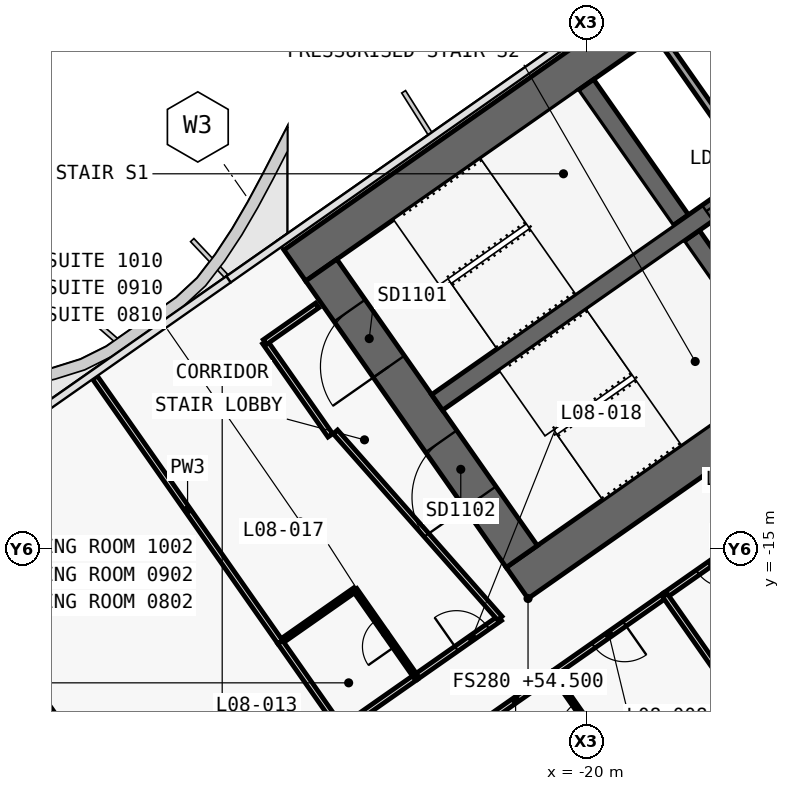
"""IFC4 building model, lengths in metres.
Left out: names, types, materials, properties, quantities, classifications, styles, units other than length and angle.
Written with IfcOpenShell. Run it as: python <this file> out.ifc"""

import sys

from ifc_helpers import new_model, si_unit, direction, frame, frame_2d, origin, place, context, subcontext, project, spatial, polyline, rectangle, outline, extrude, element, fill, save


model = new_model("IFC4")
c1 = context("Model", 3, precision=1e-05, world=origin(), true_north=direction((0.0, 1.0)))
c2 = subcontext(c1, "Body", "Model", "MODEL_VIEW")
j1 = project(units=[si_unit("LENGTHUNIT", "METRE"), si_unit("PLANEANGLEUNIT", "RADIAN")], contexts=[c1])
p1 = place(None, origin())
s1 = spatial("IfcSite", under=j1, at=p1, CompositionType="ELEMENT")
p2 = place(p1, origin())
s2 = spatial("IfcBuilding", under=s1, at=p2, CompositionType="ELEMENT")
p3 = place(p2, frame((0.0, 0.0, 54.5)))
s3 = spatial("IfcBuildingStorey", under=s2, at=p3, CompositionType="ELEMENT", Elevation=54.5)
p4 = place(p3, frame((0.037, 11.867, 0.0), z_axis=(0.0, 0.0, 1.0), x_axis=(-0.819155306259, -0.573571777746, 0.0)))
e1 = element("IfcWall", 1, at=p4, inside=s3, PredefinedType="SHEAR", context=c2, shape_type="SweptSolid", body=[
    extrude(outline(polyline([(33.837, 0.5), (0.7, 0.5), (0.0, -0.5), (33.837, -0.5), (33.837, 0.5)])), origin(), (0.0, 0.0, 1.0), 3.6),
])
p5 = place(p3, frame((0.037, -0.585, 0.0), z_axis=(0.0, 0.0, 1.0), x_axis=(-0.819157152511, -0.573569140985, 0.0)))
e2 = element("IfcWall", 2, at=p5, inside=s3, PredefinedType="SHEAR", context=c2, shape_type="SweptSolid", body=[
    extrude(outline(polyline([(26.695, 0.5), (0.7, 0.5), (0.0, -0.5), (26.695, -0.5), (26.695, 0.5)])), origin(), (0.0, 0.0, 1.0), 3.6),
])
p6 = place(p5, frame((2.995, 0.0, 0.0)))
e3 = element("IfcOpeningElement", 3, at=p6, cuts=e2, PredefinedType="OPENING", context=c2, shape_type="SweptSolid", body=[
    extrude(rectangle(XDim=2.4, YDim=2.1, at=frame_2d((1.2, 1.05))), frame((0.0, 0.51, 0.0), z_axis=(0.0, -1.0, 0.0), x_axis=(1.0, 0.0, 0.0)), (0.0, 0.0, 1.0), 1.02),
])
p7 = place(p5, frame((11.995, 0.0, 0.0)))
e4 = element("IfcOpeningElement", 4, at=p7, cuts=e2, PredefinedType="OPENING", context=c2, shape_type="SweptSolid", body=[
    extrude(rectangle(XDim=2.4, YDim=2.1, at=frame_2d((1.2, 1.05))), frame((0.0, 0.51, 0.0), z_axis=(0.0, -1.0, 0.0), x_axis=(1.0, 0.0, 0.0)), (0.0, 0.0, 1.0), 1.02),
])
p8 = place(p3, frame((-21.708, -15.2, 0.0), z_axis=(0.0, 0.0, 1.0), x_axis=(-0.573576324356, 0.819152122709, 0.0)))
e5 = element("IfcWall", 5, at=p8, inside=s3, PredefinedType="SHEAR", context=c2, shape_type="SweptSolid", body=[
    extrude(outline(polyline([(0.0, 0.5), (0.0, -0.5), (9.2, -0.5), (9.2, 0.5), (0.0, 0.5)])), origin(), (0.0, 0.0, 1.0), 3.6),
])
p9 = place(p8, frame((6.1, 0.0, 0.0)))
e6 = element("IfcOpeningElement", 6, at=p9, cuts=e5, PredefinedType="OPENING", context=c2, shape_type="SweptSolid", body=[
    extrude(rectangle(XDim=1.8, YDim=2.1, at=frame_2d((0.9, 1.05))), frame((0.0, 0.51, 0.0), z_axis=(0.0, -1.0, 0.0), x_axis=(1.0, 0.0, 0.0)), (0.0, 0.0, 1.0), 1.02),
])
p10 = place(p8, frame((1.9, 0.0, 0.0)))
e7 = element("IfcOpeningElement", 7, at=p10, cuts=e5, PredefinedType="OPENING", context=c2, shape_type="SweptSolid", body=[
    extrude(rectangle(XDim=1.8, YDim=2.1, at=frame_2d((0.9, 1.05))), frame((0.0, 0.51, 0.0), z_axis=(0.0, -1.0, 0.0), x_axis=(1.0, 0.0, 0.0)), (0.0, 0.0, 1.0), 1.02),
])
p11 = place(p3, frame((-14.745, -10.324, 0.0), z_axis=(0.0, 0.0, 1.0), x_axis=(-0.57356780395, 0.819158088694, 0.0)))
e8 = element("IfcWall", 8, at=p11, inside=s3, PredefinedType="SHEAR", context=c2, shape_type="SweptSolid", body=[
    extrude(outline(polyline([(4.35, 0.25), (0.0, 0.25), (0.0, -0.25), (4.35, -0.25), (4.35, 0.25)])), origin(), (0.0, 0.0, 1.0), 3.6),
])
p12 = place(p3, frame((-17.527, -6.352, 0.0), z_axis=(0.0, 0.0, 1.0), x_axis=(-0.573530143085, 0.819184457233, 0.0)))
e9 = element("IfcWall", 9, at=p12, inside=s3, PredefinedType="SHEAR", context=c2, shape_type="SweptSolid", body=[
    extrude(outline(polyline([(4.35, -0.25), (4.35, 0.25), (0.0, 0.25), (0.0, -0.25), (4.35, -0.25)])), origin(), (0.0, 0.0, 1.0), 3.6),
])
p13 = place(p3, frame((-2.638, 3.768, 0.0), z_axis=(0.0, 0.0, 1.0), x_axis=(-0.819148977158, -0.573580816643, 0.0)))
e10 = element("IfcWall", 10, at=p13, inside=s3, PredefinedType="SHEAR", context=c2, shape_type="SweptSolid", body=[
    extrude(outline(polyline([(26.0, 0.25), (0.0, 0.25), (0.0, -0.25), (26.0, -0.25), (26.0, 0.25)])), origin(), (0.0, 0.0, 1.0), 3.6),
])
p14 = place(p13, frame((1.169, 0.0, 0.0)))
e11 = element("IfcOpeningElement", 11, at=p14, cuts=e10, PredefinedType="OPENING", context=c2, shape_type="SweptSolid", body=[
    extrude(rectangle(XDim=1.1, YDim=2.1, at=frame_2d((0.55, 1.05))), frame((0.0, 0.26, 0.0), z_axis=(0.0, -1.0, 0.0), x_axis=(1.0, 0.0, 0.0)), (0.0, 0.0, 1.0), 0.52),
])
p15 = place(p13, frame((3.206, 0.0, 0.0)))
e12 = element("IfcOpeningElement", 12, at=p15, cuts=e10, PredefinedType="OPENING", context=c2, shape_type="SweptSolid", body=[
    extrude(rectangle(XDim=1.1, YDim=2.1, at=frame_2d((0.55, 1.05))), frame((0.0, 0.26, 0.0), z_axis=(0.0, -1.0, 0.0), x_axis=(1.0, 0.0, 0.0)), (0.0, 0.0, 1.0), 0.52),
])
p16 = place(p13, frame((5.244, 0.0, 0.0)))
e13 = element("IfcOpeningElement", 13, at=p16, cuts=e10, PredefinedType="OPENING", context=c2, shape_type="SweptSolid", body=[
    extrude(rectangle(XDim=1.1, YDim=2.1, at=frame_2d((0.55, 1.05))), frame((0.0, 0.26, 0.0), z_axis=(0.0, -1.0, 0.0), x_axis=(1.0, 0.0, 0.0)), (0.0, 0.0, 1.0), 0.52),
])
p17 = place(p13, frame((7.281, 0.0, 0.0)))
e14 = element("IfcOpeningElement", 14, at=p17, cuts=e10, PredefinedType="OPENING", context=c2, shape_type="SweptSolid", body=[
    extrude(rectangle(XDim=1.1, YDim=2.1, at=frame_2d((0.55, 1.05))), frame((0.0, 0.26, 0.0), z_axis=(0.0, -1.0, 0.0), x_axis=(1.0, 0.0, 0.0)), (0.0, 0.0, 1.0), 0.52),
])
p18 = place(p13, frame((9.688, 0.0, 0.0)))
e15 = element("IfcOpeningElement", 15, at=p18, cuts=e10, PredefinedType="OPENING", context=c2, shape_type="SweptSolid", body=[
    extrude(rectangle(XDim=1.1, YDim=2.1, at=frame_2d((0.55, 1.05))), frame((0.0, 0.26, 0.0), z_axis=(0.0, -1.0, 0.0), x_axis=(1.0, 0.0, 0.0)), (0.0, 0.0, 1.0), 0.52),
])
p19 = place(p13, frame((11.863, 0.0, 0.0)))
e16 = element("IfcOpeningElement", 16, at=p19, cuts=e10, PredefinedType="OPENING", context=c2, shape_type="SweptSolid", body=[
    extrude(rectangle(XDim=1.1, YDim=2.1, at=frame_2d((0.55, 1.05))), frame((0.0, 0.26, 0.0), z_axis=(0.0, -1.0, 0.0), x_axis=(1.0, 0.0, 0.0)), (0.0, 0.0, 1.0), 0.52),
])
p20 = place(p13, frame((14.038, 0.0, 0.0)))
e17 = element("IfcOpeningElement", 17, at=p20, cuts=e10, PredefinedType="OPENING", context=c2, shape_type="SweptSolid", body=[
    extrude(rectangle(XDim=1.1, YDim=2.1, at=frame_2d((0.55, 1.05))), frame((0.0, 0.26, 0.0), z_axis=(0.0, -1.0, 0.0), x_axis=(1.0, 0.0, 0.0)), (0.0, 0.0, 1.0), 0.52),
])
p21 = place(p13, frame((16.212, 0.0, 0.0)))
e18 = element("IfcOpeningElement", 18, at=p21, cuts=e10, PredefinedType="OPENING", context=c2, shape_type="SweptSolid", body=[
    extrude(rectangle(XDim=1.1, YDim=2.1, at=frame_2d((0.55, 1.05))), frame((0.0, 0.26, 0.0), z_axis=(0.0, -1.0, 0.0), x_axis=(1.0, 0.0, 0.0)), (0.0, 0.0, 1.0), 0.52),
])
p22 = place(p3, frame((-15.622, -5.018, 0.0), z_axis=(0.0, 0.0, 1.0), x_axis=(-0.573594173421, 0.819139624372, 0.0)))
e19 = element("IfcWall", 19, at=p22, inside=s3, PredefinedType="SOLIDWALL", context=c2, shape_type="SweptSolid", body=[
    extrude(rectangle(XDim=4.35, YDim=0.2, at=frame_2d((2.175, 0.0))), origin(), (0.0, 0.0, 1.0), 3.6),
])
p23 = place(p3, frame((-24.493, -18.371, 0.0), z_axis=(0.0, 0.0, 1.0), x_axis=(0.819176640776, 0.573541307325, 0.0)))
e20 = element("IfcWall", 20, at=p23, inside=s3, PredefinedType="PARTITIONING", context=c2, shape_type="SweptSolid", body=[
    extrude(rectangle(XDim=2.698, YDim=0.15, at=frame_2d((1.349, 0.0))), origin(), (0.0, 0.0, 1.0), 3.32),
])
p24 = place(p23, frame((1.301, 0.0, 0.0)))
e21 = element("IfcOpeningElement", 21, at=p24, cuts=e20, PredefinedType="OPENING", context=c2, shape_type="SweptSolid", body=[
    extrude(rectangle(XDim=1.0, YDim=2.1, at=frame_2d((0.5, 1.05))), frame((0.0, 0.085, 0.0), z_axis=(0.0, -1.0, 0.0), x_axis=(1.0, 0.0, 0.0)), (0.0, 0.0, 1.0), 0.17),
])
p25 = place(p3, frame((-26.46, -19.748, 0.0), z_axis=(0.0, 0.0, 1.0), x_axis=(0.819179439794, 0.573537309527, 0.0)))
e22 = element("IfcWall", 22, at=p25, inside=s3, PredefinedType="PARTITIONING", context=c2, shape_type="SweptSolid", body=[
    extrude(rectangle(XDim=2.404, YDim=0.15, at=frame_2d((1.202, 0.0))), origin(), (0.0, 0.0, 1.0), 3.32),
])
p26 = place(p3, frame((-15.48, -14.501, 0.0), z_axis=(0.0, 0.0, 1.0), x_axis=(-0.819193738533, -0.573516886193, 0.0)))
e23 = element("IfcWall", 23, at=p26, inside=s3, PredefinedType="PARTITIONING", context=c2, shape_type="SweptSolid", body=[
    extrude(rectangle(XDim=3.004, YDim=0.15, at=frame_2d((1.502, 0.0))), origin(), (0.0, 0.0, 1.0), 3.32),
])
p27 = place(p26, frame((1.052, 0.0, 0.0)))
e24 = element("IfcOpeningElement", 24, at=p27, cuts=e23, PredefinedType="OPENING", context=c2, shape_type="SweptSolid", body=[
    extrude(rectangle(XDim=0.9, YDim=2.1, at=frame_2d((0.45, 1.05))), frame((0.0, 0.085, 0.0), z_axis=(0.0, -1.0, 0.0), x_axis=(1.0, 0.0, 0.0)), (0.0, 0.0, 1.0), 0.17),
])
p28 = place(p3, frame((-17.937, -16.222, 0.0), z_axis=(0.0, 0.0, 1.0), x_axis=(-0.819145961204, -0.573585123798, 0.0)))
e25 = element("IfcWall", 25, at=p28, inside=s3, PredefinedType="PARTITIONING", context=c2, shape_type="SweptSolid", body=[
    extrude(rectangle(XDim=3.603, YDim=0.15, at=frame_2d((1.802, 0.0))), origin(), (0.0, 0.0, 1.0), 2.6),
])
p29 = place(p28, frame((1.302, 0.0, 0.0)))
e26 = element("IfcOpeningElement", 26, at=p29, cuts=e25, PredefinedType="OPENING", context=c2, shape_type="SweptSolid", body=[
    extrude(rectangle(XDim=1.0, YDim=2.1, at=frame_2d((0.5, 1.05))), frame((0.0, 0.085, 0.0), z_axis=(0.0, -1.0, 0.0), x_axis=(1.0, 0.0, 0.0)), (0.0, 0.0, 1.0), 0.17),
])
p30 = place(p3, frame((-20.886, -18.287, 0.0), z_axis=(0.0, 0.0, 1.0), x_axis=(-0.819146032251, -0.573585022335, 0.0)))
e27 = element("IfcWall", 27, at=p30, inside=s3, PredefinedType="PARTITIONING", context=c2, shape_type="SweptSolid", body=[
    extrude(rectangle(XDim=2.404, YDim=0.15, at=frame_2d((1.202, 0.0))), origin(), (0.0, 0.0, 1.0), 3.32),
])
p31 = place(p3, frame((-26.746, -12.014, 0.0), z_axis=(0.0, 0.0, 1.0), x_axis=(-0.573560650686, 0.819163097304, 0.0)))
e28 = element("IfcWall", 28, at=p31, inside=s3, PredefinedType="PARTITIONING", context=c2, shape_type="SweptSolid", body=[
    extrude(rectangle(XDim=3.0, YDim=0.15, at=frame_2d((1.5, 0.0))), origin(), (0.0, 0.0, 1.0), 3.32),
])
p32 = place(p3, frame((-28.467, -9.556, 0.0), z_axis=(0.0, 0.0, 1.0), x_axis=(0.819109000826, 0.573637903879, 0.0)))
e29 = element("IfcWall", 29, at=p32, inside=s3, PredefinedType="PARTITIONING", context=c2, shape_type="SweptSolid", body=[
    extrude(rectangle(XDim=1.68, YDim=0.15, at=frame_2d((0.84, 0.0))), origin(), (0.0, 0.0, 1.0), 3.32),
])
p33 = place(p3, frame((-22.284, -16.827, 0.0), z_axis=(0.0, 0.0, 1.0), x_axis=(-0.661545117561, 0.749905365651, 0.0)))
e30 = element("IfcWall", 30, at=p33, inside=s3, PredefinedType="PARTITIONING", context=c2, shape_type="SweptSolid", body=[
    extrude(rectangle(XDim=6.543, YDim=0.15, at=frame_2d((3.271, 0.0))), origin(), (0.0, 0.0, 1.0), 2.6),
])
p34 = place(p3, frame((-24.492, -18.37, 0.0), z_axis=(0.0, 0.0, 1.0), x_axis=(-0.573550118428, 0.819170471667, 0.0)))
e31 = element("IfcWall", 31, at=p34, inside=s3, PredefinedType="PARTITIONING", context=c2, shape_type="SweptSolid", body=[
    extrude(rectangle(XDim=2.8, YDim=0.12, at=frame_2d((1.4, 0.0))), origin(), (0.0, 0.0, 1.0), 2.6),
])
p35 = place(p34, frame((0.975, 0.0, 0.0)))
e32 = element("IfcOpeningElement", 32, at=p35, cuts=e31, PredefinedType="OPENING", context=c2, shape_type="SweptSolid", body=[
    extrude(rectangle(XDim=0.85, YDim=2.05, at=frame_2d((0.425, 1.025))), frame((0.0, 0.07, 0.0), z_axis=(0.0, -1.0, 0.0), x_axis=(1.0, 0.0, 0.0)), (0.0, 0.0, 1.0), 0.14),
])
p36 = place(p3, frame((-26.099, -16.076, 0.0), z_axis=(0.0, 0.0, 1.0), x_axis=(-0.819155442668, -0.573571582932, 0.0)))
e33 = element("IfcWall", 33, at=p36, inside=s3, PredefinedType="PARTITIONING", context=c2, shape_type="SweptSolid", body=[
    extrude(rectangle(XDim=2.4, YDim=0.12, at=frame_2d((1.2, 0.0))), origin(), (0.0, 0.0, 1.0), 3.32),
])
p37 = place(p3, frame((-28.065, -17.453, 0.0), z_axis=(0.0, 0.0, 1.0), x_axis=(-0.573593433868, 0.819140142237, 0.0)))
e34 = element("IfcWall", 34, at=p37, inside=s3, PredefinedType="PARTITIONING", context=c2, shape_type="SweptSolid", body=[
    extrude(rectangle(XDim=8.499, YDim=0.15, at=frame_2d((4.25, 0.0))), origin(), (0.0, 0.0, 1.0), 2.6),
])
p38 = place(p3, frame((-26.458, -19.747, 0.0), z_axis=(0.0, 0.0, 1.0), x_axis=(-0.573550118428, 0.819170471667, 0.0)))
e35 = element("IfcWall", 35, at=p38, inside=s3, PredefinedType="PARTITIONING", context=c2, shape_type="SweptSolid", body=[
    extrude(rectangle(XDim=2.8, YDim=0.15, at=frame_2d((1.4, 0.0))), origin(), (0.0, 0.0, 1.0), 2.6),
])
p39 = place(p3, frame((-31.373, -23.189, 0.0), z_axis=(0.0, 0.0, 1.0), x_axis=(-0.573571089604, 0.819155788095, 0.0)))
e36 = element("IfcWall", 36, at=p39, inside=s3, PredefinedType="PARTITIONING", context=c2, shape_type="SweptSolid", body=[
    extrude(rectangle(XDim=11.3, YDim=0.15, at=frame_2d((5.65, 0.0))), origin(), (0.0, 0.0, 1.0), 2.5),
])
p40 = place(p3, frame((-13.752, -22.203, 0.0), z_axis=(0.0, 0.0, 1.0), x_axis=(-0.573594765376, 0.819139209862, 0.0)))
e37 = element("IfcWall", 37, at=p40, inside=s3, PredefinedType="PARTITIONING", context=c2, shape_type="SweptSolid", body=[
    extrude(rectangle(XDim=7.3, YDim=0.15, at=frame_2d((3.65, 0.0))), origin(), (0.0, 0.0, 1.0), 2.5),
])
p41 = place(p3, frame((-19.281, -20.581, 0.0), z_axis=(0.0, 0.0, 1.0), x_axis=(-0.573550118428, 0.819170471667, 0.0)))
e38 = element("IfcWall", 38, at=p41, inside=s3, PredefinedType="PARTITIONING", context=c2, shape_type="SweptSolid", body=[
    extrude(rectangle(XDim=2.8, YDim=0.12, at=frame_2d((1.4, 0.0))), origin(), (0.0, 0.0, 1.0), 3.32),
])
p42 = place(p41, frame((0.975, 0.0, 0.0)))
e39 = element("IfcOpeningElement", 39, at=p42, cuts=e38, PredefinedType="OPENING", context=c2, shape_type="SweptSolid", body=[
    extrude(rectangle(XDim=0.85, YDim=2.05, at=frame_2d((0.425, 1.025))), frame((0.0, 0.07, 0.0), z_axis=(0.0, -1.0, 0.0), x_axis=(1.0, 0.0, 0.0)), (0.0, 0.0, 1.0), 0.14),
])
p43 = place(p21, origin())
e40 = element("IfcDoor", 40, at=p43, inside=s3, OperationType="SLIDING_TO_RIGHT", PredefinedType="DOOR", context=c2, shape_type="SweptSolid", body=[
    extrude(rectangle(XDim=1.1, YDim=2.1, at=frame_2d((0.55, 1.05))), frame((0.0, 0.025, 0.0), z_axis=(0.0, -1.0, 0.0), x_axis=(1.0, 0.0, 0.0)), (0.0, 0.0, 1.0), 0.05),
])
fill(e18, e40)
p44 = place(p9, origin())
e41 = element("IfcDoor", 41, at=p44, inside=s3, OperationType="DOUBLE_DOOR_SINGLE_SWING", PredefinedType="DOOR", context=c2, shape_type="SweptSolid", body=[
    extrude(rectangle(XDim=1.8, YDim=2.1, at=frame_2d((0.9, 1.05))), frame((0.0, 0.025, 0.0), z_axis=(0.0, -1.0, 0.0), x_axis=(1.0, 0.0, 0.0)), (0.0, 0.0, 1.0), 0.05),
])
fill(e6, e41)
p45 = place(p10, origin())
e42 = element("IfcDoor", 42, at=p45, inside=s3, OperationType="DOUBLE_DOOR_SINGLE_SWING", PredefinedType="DOOR", context=c2, shape_type="SweptSolid", body=[
    extrude(rectangle(XDim=1.8, YDim=2.1, at=frame_2d((0.9, 1.05))), frame((0.0, 0.025, 0.0), z_axis=(0.0, -1.0, 0.0), x_axis=(1.0, 0.0, 0.0)), (0.0, 0.0, 1.0), 0.05),
])
fill(e7, e42)
p46 = place(p27, origin())
e43 = element("IfcDoor", 43, at=p46, inside=s3, OperationType="SINGLE_SWING_RIGHT", PredefinedType="DOOR", context=c2, shape_type="SweptSolid", body=[
    extrude(rectangle(XDim=0.9, YDim=2.1, at=frame_2d((0.45, 1.05))), frame((0.0, 0.025, 0.0), z_axis=(0.0, -1.0, 0.0), x_axis=(1.0, 0.0, 0.0)), (0.0, 0.0, 1.0), 0.05),
])
fill(e24, e43)
p47 = place(p42, origin())
e44 = element("IfcDoor", 44, at=p47, inside=s3, OperationType="SINGLE_SWING_RIGHT", PredefinedType="DOOR", context=c2, shape_type="SweptSolid", body=[
    extrude(rectangle(XDim=0.85, YDim=2.05, at=frame_2d((0.425, 1.025))), frame((0.0, 0.025, 0.0), z_axis=(0.0, -1.0, 0.0), x_axis=(1.0, 0.0, 0.0)), (0.0, 0.0, 1.0), 0.05),
])
fill(e39, e44)
p48 = place(p29, origin())
e45 = element("IfcDoor", 45, at=p48, inside=s3, OperationType="SINGLE_SWING_LEFT", PredefinedType="DOOR", context=c2, shape_type="SweptSolid", body=[
    extrude(rectangle(XDim=1.0, YDim=2.1, at=frame_2d((0.5, 1.05))), frame((0.0, 0.025, 0.0), z_axis=(0.0, -1.0, 0.0), x_axis=(1.0, 0.0, 0.0)), (0.0, 0.0, 1.0), 0.05),
])
fill(e26, e45)
p49 = place(p35, origin())
e46 = element("IfcDoor", 46, at=p49, inside=s3, OperationType="SINGLE_SWING_LEFT", PredefinedType="DOOR", context=c2, shape_type="SweptSolid", body=[
    extrude(rectangle(XDim=0.85, YDim=2.05, at=frame_2d((0.425, 1.025))), frame((0.0, 0.025, 0.0), z_axis=(0.0, -1.0, 0.0), x_axis=(1.0, 0.0, 0.0)), (0.0, 0.0, 1.0), 0.05),
])
fill(e32, e46)
p50 = place(p24, origin())
e47 = element("IfcDoor", 47, at=p50, inside=s3, OperationType="SINGLE_SWING_RIGHT", PredefinedType="DOOR", context=c2, shape_type="SweptSolid", body=[
    extrude(rectangle(XDim=1.0, YDim=2.1, at=frame_2d((0.5, 1.05))), frame((0.0, 0.025, 0.0), z_axis=(0.0, -1.0, 0.0), x_axis=(1.0, 0.0, 0.0)), (0.0, 0.0, 1.0), 0.05),
])
fill(e21, e47)
save(model, sys.argv[1])
